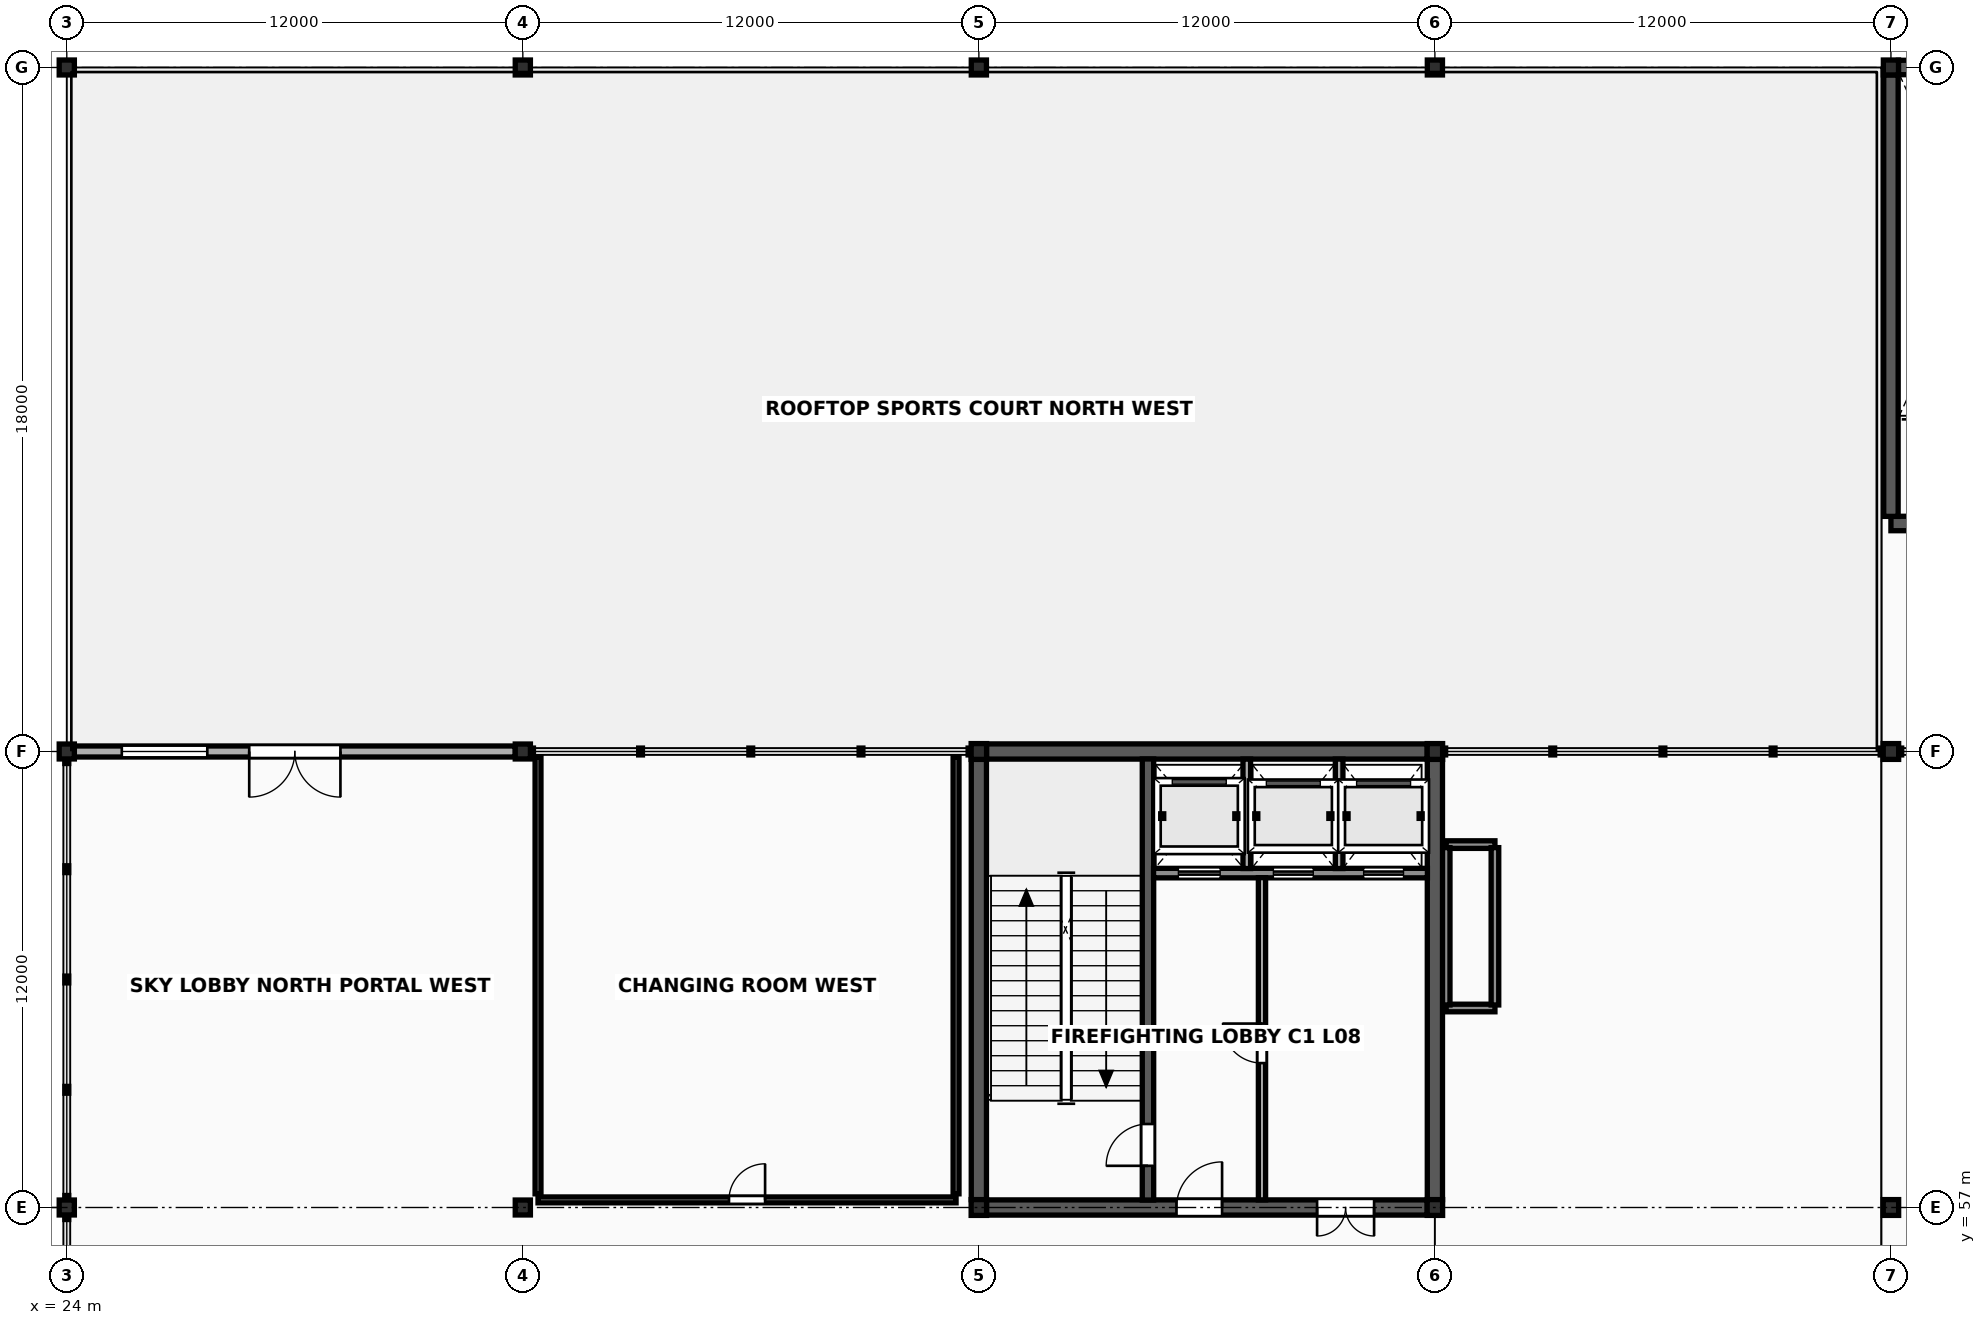
"""IFC4 building model, lengths in metres.
Left out: names, types, materials, properties, quantities, classifications, styles, units other than length and angle.
Written with IfcOpenShell. Run it as: python <this file> out.ifc"""

import sys

from ifc_helpers import new_model, si_unit, direction, frame, frame_2d, origin, origin_2d, place, context, subcontext, project, spatial, rectangle, i_section, extrude, element, fill, save


model = new_model("IFC4")
c1 = context("Model", 3, precision=1e-05, world=origin(), true_north=direction((0.0, 1.0)))
c2 = subcontext(c1, "Body", "Model", "MODEL_VIEW")
j1 = project(units=[si_unit("LENGTHUNIT", "METRE"), si_unit("PLANEANGLEUNIT", "RADIAN")], contexts=[c1])
p1 = place(None, origin())
s1 = spatial("IfcSite", under=j1, at=p1, CompositionType="ELEMENT")
p2 = place(p1, origin())
s2 = spatial("IfcBuilding", under=s1, at=p2, CompositionType="ELEMENT")
p3 = place(p2, frame((0.0, 0.0, 32.4)))
s3 = spatial("IfcBuildingStorey", under=s2, at=p3, CompositionType="ELEMENT", Elevation=32.4)
for number, where, z_axis, x_axis in (
    (1, (24.0, 57.0, 0.0), (0.0, 0.0, 1.0), (1.0, 0.0, 0.0)),
    (2, (24.0, 69.0, 0.0), (0.0, 0.0, 1.0), (1.0, 0.0, 0.0)),
    (3, (24.0, 87.0, 0.0), (0.0, 0.0, 1.0), (1.0, 0.0, 0.0)),
    (4, (36.0, 57.0, 0.0), (0.0, 0.0, 1.0), (1.0, 0.0, 0.0)),
    (5, (36.0, 69.0, 0.0), (0.0, 0.0, 1.0), (1.0, 0.0, 0.0)),
    (6, (36.0, 87.0, 0.0), (0.0, 0.0, 1.0), (1.0, 0.0, 0.0)),
):
    element("IfcColumn", number, at=place(p3, frame(where, z_axis=z_axis, x_axis=x_axis)), inside=s3, PredefinedType="COLUMN", context=c2, shape_type="SweptSolid", body=[
        extrude(i_section(OverallWidth=0.399, OverallDepth=0.393, WebThickness=0.023, FlangeThickness=0.037, FilletRadius=0.018, at=origin_2d()), origin(), (0.0, 0.0, 1.0), 5.2),
    ])
for number, where, z_axis, x_axis in (
    (7, (48.0, 57.0, 0.0), (0.0, 0.0, 1.0), (1.0, 0.0, 0.0)),
    (8, (48.0, 69.0, 0.0), (0.0, 0.0, 1.0), (1.0, 0.0, 0.0)),
):
    element("IfcColumn", number, at=place(p3, frame(where, z_axis=z_axis, x_axis=x_axis)), inside=s3, PredefinedType="COLUMN", context=c2, shape_type="SweptSolid", body=[
        extrude(i_section(OverallWidth=0.406, OverallDepth=0.416, WebThickness=0.03, FlangeThickness=0.048, FilletRadius=0.018, at=origin_2d()), origin(), (0.0, 0.0, 1.0), 5.2),
    ])
p4 = place(p3, frame((48.0, 87.0, 0.0), z_axis=(0.0, 0.0, 1.0), x_axis=(1.0, 0.0, 0.0)))
e9 = element("IfcColumn", 9, at=p4, inside=s3, PredefinedType="COLUMN", context=c2, shape_type="SweptSolid", body=[
    extrude(i_section(OverallWidth=0.399, OverallDepth=0.393, WebThickness=0.023, FlangeThickness=0.037, FilletRadius=0.018, at=origin_2d()), origin(), (0.0, 0.0, 1.0), 5.2),
])
for number, where, z_axis, x_axis in (
    (10, (60.0, 57.0, 0.0), (0.0, 0.0, 1.0), (1.0, 0.0, 0.0)),
    (11, (60.0, 69.0, 0.0), (0.0, 0.0, 1.0), (1.0, 0.0, 0.0)),
):
    element("IfcColumn", number, at=place(p3, frame(where, z_axis=z_axis, x_axis=x_axis)), inside=s3, PredefinedType="COLUMN", context=c2, shape_type="SweptSolid", body=[
        extrude(i_section(OverallWidth=0.406, OverallDepth=0.416, WebThickness=0.03, FlangeThickness=0.048, FilletRadius=0.018, at=origin_2d()), origin(), (0.0, 0.0, 1.0), 5.2),
    ])
p5 = place(p3, frame((60.0, 87.0, 0.0), z_axis=(0.0, 0.0, 1.0), x_axis=(1.0, 0.0, 0.0)))
e12 = element("IfcColumn", 12, at=p5, inside=s3, PredefinedType="COLUMN", context=c2, shape_type="SweptSolid", body=[
    extrude(i_section(OverallWidth=0.399, OverallDepth=0.393, WebThickness=0.023, FlangeThickness=0.037, FilletRadius=0.018, at=origin_2d()), origin(), (0.0, 0.0, 1.0), 5.2),
])
for number, where, z_axis, x_axis in (
    (13, (72.0, 57.0, 0.0), (0.0, 0.0, 1.0), (1.0, 0.0, 0.0)),
    (14, (72.0, 69.0, 0.0), (0.0, 0.0, 1.0), (1.0, 0.0, 0.0)),
):
    element("IfcColumn", number, at=place(p3, frame(where, z_axis=z_axis, x_axis=x_axis)), inside=s3, PredefinedType="COLUMN", context=c2, shape_type="SweptSolid", body=[
        extrude(i_section(OverallWidth=0.406, OverallDepth=0.416, WebThickness=0.03, FlangeThickness=0.048, FilletRadius=0.018, at=origin_2d()), origin(), (0.0, 0.0, 1.0), 5.2),
    ])
p6 = place(p3, frame((72.0, 87.0, 0.0), z_axis=(0.0, 0.0, 1.0), x_axis=(1.0, 0.0, 0.0)))
e15 = element("IfcColumn", 15, at=p6, inside=s3, PredefinedType="COLUMN", context=c2, shape_type="SweptSolid", body=[
    extrude(i_section(OverallWidth=0.399, OverallDepth=0.393, WebThickness=0.023, FlangeThickness=0.037, FilletRadius=0.018, at=origin_2d()), origin(), (0.0, 0.0, 1.0), 5.2),
])
for number, where, z_axis, x_axis in (
    (16, (60.297, 62.25, 0.0), (0.0, 0.0, 1.0), (1.0, 0.0, 0.0)),
    (17, (60.297, 66.55, 0.0), (0.0, 0.0, 1.0), (1.0, 0.0, 0.0)),
):
    element("IfcWall", number, at=place(p3, frame(where, z_axis=z_axis, x_axis=x_axis)), inside=s3, PredefinedType="SOLIDWALL", context=c2, shape_type="SweptSolid", body=[
        extrude(rectangle(XDim=1.283, YDim=0.2, at=frame_2d((0.642, 0.0))), origin(), (0.0, 0.0, 1.0), 5.043),
    ])
for number, where, z_axis, x_axis in (
    (18, (60.297, 62.33, 0.0), (0.0, 0.0, 1.0), (0.0, 1.0, 0.0)),
    (19, (61.58, 62.33, 0.0), (0.0, 0.0, 1.0), (0.0, 1.0, 0.0)),
):
    element("IfcWall", number, at=place(p3, frame(where, z_axis=z_axis, x_axis=x_axis)), inside=s3, PredefinedType="SOLIDWALL", context=c2, shape_type="SweptSolid", body=[
        extrude(rectangle(XDim=4.14, YDim=0.2, at=frame_2d((2.07, 0.0))), origin(), (0.0, 0.0, 1.0), 5.043),
    ])
p7 = place(p3, frame((48.2, 57.0, 0.0), z_axis=(0.0, 0.0, 1.0), x_axis=(1.0, 0.0, 0.0)))
e20 = element("IfcWall", 20, at=p7, inside=s3, PredefinedType="SHEAR", context=c2, shape_type="SweptSolid", body=[
    extrude(rectangle(XDim=11.6, YDim=0.4, at=frame_2d((5.8, 0.0))), origin(), (0.0, 0.0, 1.0), 5.043),
])
p8 = place(p7, frame((5.0, 0.0, 0.0)))
e21 = element("IfcOpeningElement", 21, at=p8, cuts=e20, PredefinedType="OPENING", context=c2, shape_type="SweptSolid", body=[
    extrude(rectangle(XDim=1.2, YDim=2.2, at=frame_2d((0.6, 1.1))), frame((0.0, 0.215, 0.0), z_axis=(0.0, -1.0, 0.0), x_axis=(1.0, 0.0, 0.0)), (0.0, 0.0, 1.0), 0.43),
])
p9 = place(p7, frame((8.7, 0.0, 0.0)))
e22 = element("IfcOpeningElement", 22, at=p9, cuts=e20, PredefinedType="OPENING", context=c2, shape_type="SweptSolid", body=[
    extrude(rectangle(XDim=1.5, YDim=2.25, at=frame_2d((0.75, 1.125))), frame((0.0, 0.215, 0.0), z_axis=(0.0, -1.0, 0.0), x_axis=(1.0, 0.0, 0.0)), (0.0, 0.0, 1.0), 0.43),
])
p10 = place(p3, frame((48.2, 69.0, 0.0), z_axis=(0.0, 0.0, 1.0), x_axis=(1.0, 0.0, 0.0)))
e23 = element("IfcWall", 23, at=p10, inside=s3, PredefinedType="SHEAR", context=c2, shape_type="SweptSolid", body=[
    extrude(rectangle(XDim=11.6, YDim=0.4, at=frame_2d((5.8, 0.0))), origin(), (0.0, 0.0, 1.0), 5.043),
])
for number, where, z_axis, x_axis in (
    (24, (48.0, 57.205, 0.0), (0.0, 0.0, 1.0), (0.0, 1.0, 0.0)),
    (25, (60.0, 57.205, 0.0), (0.0, 0.0, 1.0), (0.0, 1.0, 0.0)),
):
    element("IfcWall", number, at=place(p3, frame(where, z_axis=z_axis, x_axis=x_axis)), inside=s3, PredefinedType="SHEAR", context=c2, shape_type="SweptSolid", body=[
        extrude(rectangle(XDim=11.59, YDim=0.4, at=frame_2d((5.795, 0.0))), origin(), (0.0, 0.0, 1.0), 5.043),
    ])
p11 = place(p3, frame((52.45, 57.197, 0.0), z_axis=(0.0, 0.0, 1.0), x_axis=(0.0, 1.0, 0.0)))
e26 = element("IfcWall", 26, at=p11, inside=s3, PredefinedType="SHEAR", context=c2, shape_type="SweptSolid", body=[
    extrude(rectangle(XDim=11.606, YDim=0.3, at=frame_2d((5.803, 0.0))), origin(), (0.0, 0.0, 1.0), 5.043),
])
p12 = place(p11, frame((0.9, 0.0, 0.0)))
e27 = element("IfcOpeningElement", 27, at=p12, cuts=e26, PredefinedType="OPENING", context=c2, shape_type="SweptSolid", body=[
    extrude(rectangle(XDim=1.1, YDim=2.2, at=frame_2d((0.55, 1.1))), frame((0.0, 0.165, 0.0), z_axis=(0.0, -1.0, 0.0), x_axis=(1.0, 0.0, 0.0)), (0.0, 0.0, 1.0), 0.33),
])
p13 = place(p3, frame((52.597, 65.8, 0.0), z_axis=(0.0, 0.0, 1.0), x_axis=(1.0, 0.0, 0.0)))
e28 = element("IfcWall", 28, at=p13, inside=s3, PredefinedType="SOLIDWALL", context=c2, shape_type="SweptSolid", body=[
    extrude(rectangle(XDim=7.206, YDim=0.25, at=frame_2d((3.603, 0.0))), origin(), (0.0, 0.0, 1.0), 5.043),
])
p14 = place(p13, frame((0.653, 0.0, 0.0)))
e29 = element("IfcOpeningElement", 29, at=p14, cuts=e28, PredefinedType="OPENING", context=c2, shape_type="SweptSolid", body=[
    extrude(rectangle(XDim=1.1, YDim=2.24, at=frame_2d((0.55, 1.12))), frame((0.0, 0.14, 0.0), z_axis=(0.0, -1.0, 0.0), x_axis=(1.0, 0.0, 0.0)), (0.0, 0.0, 1.0), 0.28),
])
p15 = place(p13, frame((3.153, 0.0, 0.0)))
e30 = element("IfcOpeningElement", 30, at=p15, cuts=e28, PredefinedType="OPENING", context=c2, shape_type="SweptSolid", body=[
    extrude(rectangle(XDim=1.05, YDim=2.2, at=frame_2d((0.525, 1.1))), frame((0.0, 0.14, 0.0), z_axis=(0.0, -1.0, 0.0), x_axis=(1.0, 0.0, 0.0)), (0.0, 0.0, 1.0), 0.28),
])
p16 = place(p13, frame((5.528, 0.0, 0.0)))
e31 = element("IfcOpeningElement", 31, at=p16, cuts=e28, PredefinedType="OPENING", context=c2, shape_type="SweptSolid", body=[
    extrude(rectangle(XDim=1.05, YDim=2.2, at=frame_2d((0.525, 1.1))), frame((0.0, 0.14, 0.0), z_axis=(0.0, -1.0, 0.0), x_axis=(1.0, 0.0, 0.0)), (0.0, 0.0, 1.0), 0.28),
])
for number, where, z_axis, x_axis in (
    (32, (55.05, 65.92, 0.0), (0.0, 0.0, 1.0), (0.0, 1.0, 0.0)),
    (33, (57.48, 65.92, 0.0), (0.0, 0.0, 1.0), (0.0, 1.0, 0.0)),
):
    element("IfcWall", number, at=place(p3, frame(where, z_axis=z_axis, x_axis=x_axis)), inside=s3, PredefinedType="SOLIDWALL", context=c2, shape_type="SweptSolid", body=[
        extrude(rectangle(XDim=2.88, YDim=0.2, at=frame_2d((1.44, 0.0))), origin(), (0.0, 0.0, 1.0), 5.033),
    ])
p17 = place(p3, frame((55.45, 57.2, 0.0), z_axis=(0.0, 0.0, 1.0), x_axis=(0.0, 1.0, 0.0)))
e34 = element("IfcWall", 34, at=p17, inside=s3, PredefinedType="SOLIDWALL", context=c2, shape_type="SweptSolid", body=[
    extrude(rectangle(XDim=8.48, YDim=0.19, at=frame_2d((4.24, 0.0))), origin(), (0.0, 0.0, 1.0), 5.033),
])
p18 = place(p17, frame((3.6, 0.0, 0.0)))
e35 = element("IfcOpeningElement", 35, at=p18, cuts=e34, PredefinedType="OPENING", context=c2, shape_type="SweptSolid", body=[
    extrude(rectangle(XDim=1.04, YDim=2.18, at=frame_2d((0.52, 1.09))), frame((0.0, 0.11, 0.0), z_axis=(0.0, -1.0, 0.0), x_axis=(1.0, 0.0, 0.0)), (0.0, 0.0, 1.0), 0.22),
])
p19 = place(p3, frame((72.0, 75.0, 0.0), z_axis=(0.0, 0.0, 1.0), x_axis=(1.0, 0.0, 0.0)))
e36 = element("IfcWall", 36, at=p19, inside=s3, PredefinedType="SHEAR", context=c2, shape_type="SweptSolid", body=[
    extrude(rectangle(XDim=12.0, YDim=0.38, at=frame_2d((6.0, 0.0))), origin(), (0.0, 0.0, 1.0), 4.973),
])
p20 = place(p19, frame((7.45, 0.0, 0.0)))
e37 = element("IfcOpeningElement", 37, at=p20, cuts=e36, PredefinedType="OPENING", context=c2, shape_type="SweptSolid", body=[
    extrude(rectangle(XDim=1.5, YDim=2.25, at=frame_2d((0.75, 1.125))), frame((0.0, 0.205, 0.0), z_axis=(0.0, -1.0, 0.0), x_axis=(1.0, 0.0, 0.0)), (0.0, 0.0, 1.0), 0.41),
])
p21 = place(p3, frame((72.197, 87.0, 0.0), z_axis=(0.0, 0.0, 1.0), x_axis=(1.0, 0.0, 0.0)))
e38 = element("IfcWall", 38, at=p21, inside=s3, PredefinedType="SHEAR", context=c2, shape_type="SweptSolid", body=[
    extrude(rectangle(XDim=11.607, YDim=0.38, at=frame_2d((5.803, 0.0))), origin(), (0.0, 0.0, 1.0), 4.973),
])
p22 = place(p3, frame((72.0, 75.187, 0.0), z_axis=(0.0, 0.0, 1.0), x_axis=(0.0, 1.0, 0.0)))
e39 = element("IfcWall", 39, at=p22, inside=s3, PredefinedType="SHEAR", context=c2, shape_type="SweptSolid", body=[
    extrude(rectangle(XDim=11.619, YDim=0.38, at=frame_2d((5.81, 0.0))), origin(), (0.0, 0.0, 1.0), 4.973),
])
p23 = place(p3, frame((24.198, 69.0, 0.0), z_axis=(0.0, 0.0, 1.0), x_axis=(1.0, 0.0, 0.0)))
e40 = element("IfcWall", 40, at=p23, inside=s3, PredefinedType="SOLIDWALL", context=c2, shape_type="SweptSolid", body=[
    extrude(rectangle(XDim=11.605, YDim=0.29, at=frame_2d((5.802, 0.0))), origin(), (0.0, 0.0, 1.0), 4.1),
])
p24 = place(p23, frame((4.603, 0.0, 0.0)))
e41 = element("IfcOpeningElement", 41, at=p24, cuts=e40, PredefinedType="OPENING", context=c2, shape_type="SweptSolid", body=[
    extrude(rectangle(XDim=2.4, YDim=2.54, at=frame_2d((1.2, 1.27))), frame((0.0, 0.16, 0.0), z_axis=(0.0, -1.0, 0.0), x_axis=(1.0, 0.0, 0.0)), (0.0, 0.0, 1.0), 0.32),
])
p25 = place(p23, frame((1.25, 0.0, 1.95)))
e42 = element("IfcOpeningElement", 42, at=p25, cuts=e40, PredefinedType="OPENING", context=c2, shape_type="SweptSolid", body=[
    extrude(rectangle(XDim=2.25, YDim=0.88, at=frame_2d((1.125, 0.44))), frame((0.0, 0.16, 0.0), z_axis=(0.0, -1.0, 0.0), x_axis=(1.0, 0.0, 0.0)), (0.0, 0.0, 1.0), 0.32),
])
p26 = place(p3, frame((36.4, 57.2, 0.0), z_axis=(0.0, 0.0, 1.0), x_axis=(1.0, 0.0, 0.0)))
e43 = element("IfcWall", 43, at=p26, inside=s3, PredefinedType="PLUMBINGWALL", context=c2, shape_type="SweptSolid", body=[
    extrude(rectangle(XDim=11.0, YDim=0.155, at=frame_2d((5.5, 0.0))), origin(), (0.0, 0.0, 1.0), 2.88),
])
p27 = place(p26, frame((5.025, 0.0, 0.0)))
e44 = element("IfcOpeningElement", 44, at=p27, cuts=e43, PredefinedType="OPENING", context=c2, shape_type="SweptSolid", body=[
    extrude(rectangle(XDim=0.95, YDim=2.13, at=frame_2d((0.475, 1.065))), frame((0.0, 0.093, 0.0), z_axis=(0.0, -1.0, 0.0), x_axis=(1.0, 0.0, 0.0)), (0.0, 0.0, 1.0), 0.185),
])
for number, where, z_axis, x_axis in (
    (45, (36.4, 57.36, 0.0), (0.0, 0.0, 1.0), (0.0, 1.0, 0.0)),
    (46, (47.4, 57.36, 0.0), (0.0, 0.0, 1.0), (0.0, 1.0, 0.0)),
):
    element("IfcWall", number, at=place(p3, frame(where, z_axis=z_axis, x_axis=x_axis)), inside=s3, PredefinedType="PLUMBINGWALL", context=c2, shape_type="SweptSolid", body=[
        extrude(rectangle(XDim=11.5, YDim=0.155, at=frame_2d((5.75, 0.0))), origin(), (0.0, 0.0, 1.0), 2.88),
    ])
p28 = place(p24, origin())
e47 = element("IfcDoor", 47, at=p28, inside=s3, OperationType="DOUBLE_DOOR_SINGLE_SWING", PredefinedType="DOOR", context=c2, shape_type="SweptSolid", body=[
    extrude(rectangle(XDim=2.4, YDim=2.54, at=frame_2d((1.2, 1.27))), frame((0.0, 0.025, 0.0), z_axis=(0.0, -1.0, 0.0), x_axis=(1.0, 0.0, 0.0)), (0.0, 0.0, 1.0), 0.05),
])
fill(e41, e47)
p29 = place(p25, origin())
e48 = element("IfcWindow", 48, at=p29, inside=s3, PartitioningType="DOUBLE_PANEL_VERTICAL", PredefinedType="USERDEFINED", context=c2, shape_type="SweptSolid", body=[
    extrude(rectangle(XDim=2.25, YDim=0.88, at=frame_2d((1.125, 0.44))), frame((0.0, 0.03, 0.0), z_axis=(0.0, -1.0, 0.0), x_axis=(1.0, 0.0, 0.0)), (0.0, 0.0, 1.0), 0.06),
])
fill(e42, e48)
p30 = place(p12, origin())
e49 = element("IfcDoor", 49, at=p30, inside=s3, OperationType="SINGLE_SWING_LEFT", PredefinedType="DOOR", context=c2, shape_type="SweptSolid", body=[
    extrude(rectangle(XDim=1.1, YDim=2.2, at=frame_2d((0.55, 1.1))), frame((0.0, 0.025, 0.0), z_axis=(0.0, -1.0, 0.0), x_axis=(1.0, 0.0, 0.0)), (0.0, 0.0, 1.0), 0.05),
])
fill(e27, e49)
p31 = place(p18, origin())
e50 = element("IfcDoor", 50, at=p31, inside=s3, OperationType="SINGLE_SWING_RIGHT", PredefinedType="DOOR", context=c2, shape_type="SweptSolid", body=[
    extrude(rectangle(XDim=1.04, YDim=2.18, at=frame_2d((0.52, 1.09))), frame((0.0, 0.025, 0.0), z_axis=(0.0, -1.0, 0.0), x_axis=(1.0, 0.0, 0.0)), (0.0, 0.0, 1.0), 0.05),
])
fill(e35, e50)
p32 = place(p8, origin())
e51 = element("IfcDoor", 51, at=p32, inside=s3, OperationType="SINGLE_SWING_RIGHT", PredefinedType="DOOR", context=c2, shape_type="SweptSolid", body=[
    extrude(rectangle(XDim=1.2, YDim=2.2, at=frame_2d((0.6, 1.1))), frame((0.0, 0.025, 0.0), z_axis=(0.0, -1.0, 0.0), x_axis=(1.0, 0.0, 0.0)), (0.0, 0.0, 1.0), 0.05),
])
fill(e21, e51)
p33 = place(p9, origin())
e52 = element("IfcDoor", 52, at=p33, inside=s3, OperationType="DOUBLE_DOOR_SINGLE_SWING", PredefinedType="DOOR", context=c2, shape_type="SweptSolid", body=[
    extrude(rectangle(XDim=1.5, YDim=2.25, at=frame_2d((0.75, 1.125))), frame((0.0, 0.025, 0.0), z_axis=(0.0, -1.0, 0.0), x_axis=(1.0, 0.0, 0.0)), (0.0, 0.0, 1.0), 0.05),
])
fill(e22, e52)
p34 = place(p14, origin())
e53 = element("IfcDoor", 53, at=p34, inside=s3, OperationType="SLIDING_TO_LEFT", PredefinedType="USERDEFINED", context=c2, shape_type="SweptSolid", body=[
    extrude(rectangle(XDim=1.1, YDim=2.24, at=frame_2d((0.55, 1.12))), frame((0.0, 0.025, 0.0), z_axis=(0.0, -1.0, 0.0), x_axis=(1.0, 0.0, 0.0)), (0.0, 0.0, 1.0), 0.05),
])
fill(e29, e53)
p35 = place(p15, origin())
e54 = element("IfcDoor", 54, at=p35, inside=s3, OperationType="SLIDING_TO_LEFT", PredefinedType="USERDEFINED", context=c2, shape_type="SweptSolid", body=[
    extrude(rectangle(XDim=1.05, YDim=2.2, at=frame_2d((0.525, 1.1))), frame((0.0, 0.025, 0.0), z_axis=(0.0, -1.0, 0.0), x_axis=(1.0, 0.0, 0.0)), (0.0, 0.0, 1.0), 0.05),
])
fill(e30, e54)
p36 = place(p16, origin())
e55 = element("IfcDoor", 55, at=p36, inside=s3, OperationType="SLIDING_TO_LEFT", PredefinedType="USERDEFINED", context=c2, shape_type="SweptSolid", body=[
    extrude(rectangle(XDim=1.05, YDim=2.2, at=frame_2d((0.525, 1.1))), frame((0.0, 0.025, 0.0), z_axis=(0.0, -1.0, 0.0), x_axis=(1.0, 0.0, 0.0)), (0.0, 0.0, 1.0), 0.05),
])
fill(e31, e55)
p37 = place(p27, origin())
e56 = element("IfcDoor", 56, at=p37, inside=s3, OperationType="SINGLE_SWING_RIGHT", PredefinedType="DOOR", context=c2, shape_type="SweptSolid", body=[
    extrude(rectangle(XDim=0.95, YDim=2.13, at=frame_2d((0.475, 1.065))), frame((0.0, 0.025, 0.0), z_axis=(0.0, -1.0, 0.0), x_axis=(1.0, 0.0, 0.0)), (0.0, 0.0, 1.0), 0.05),
])
fill(e44, e56)
save(model, sys.argv[1])
